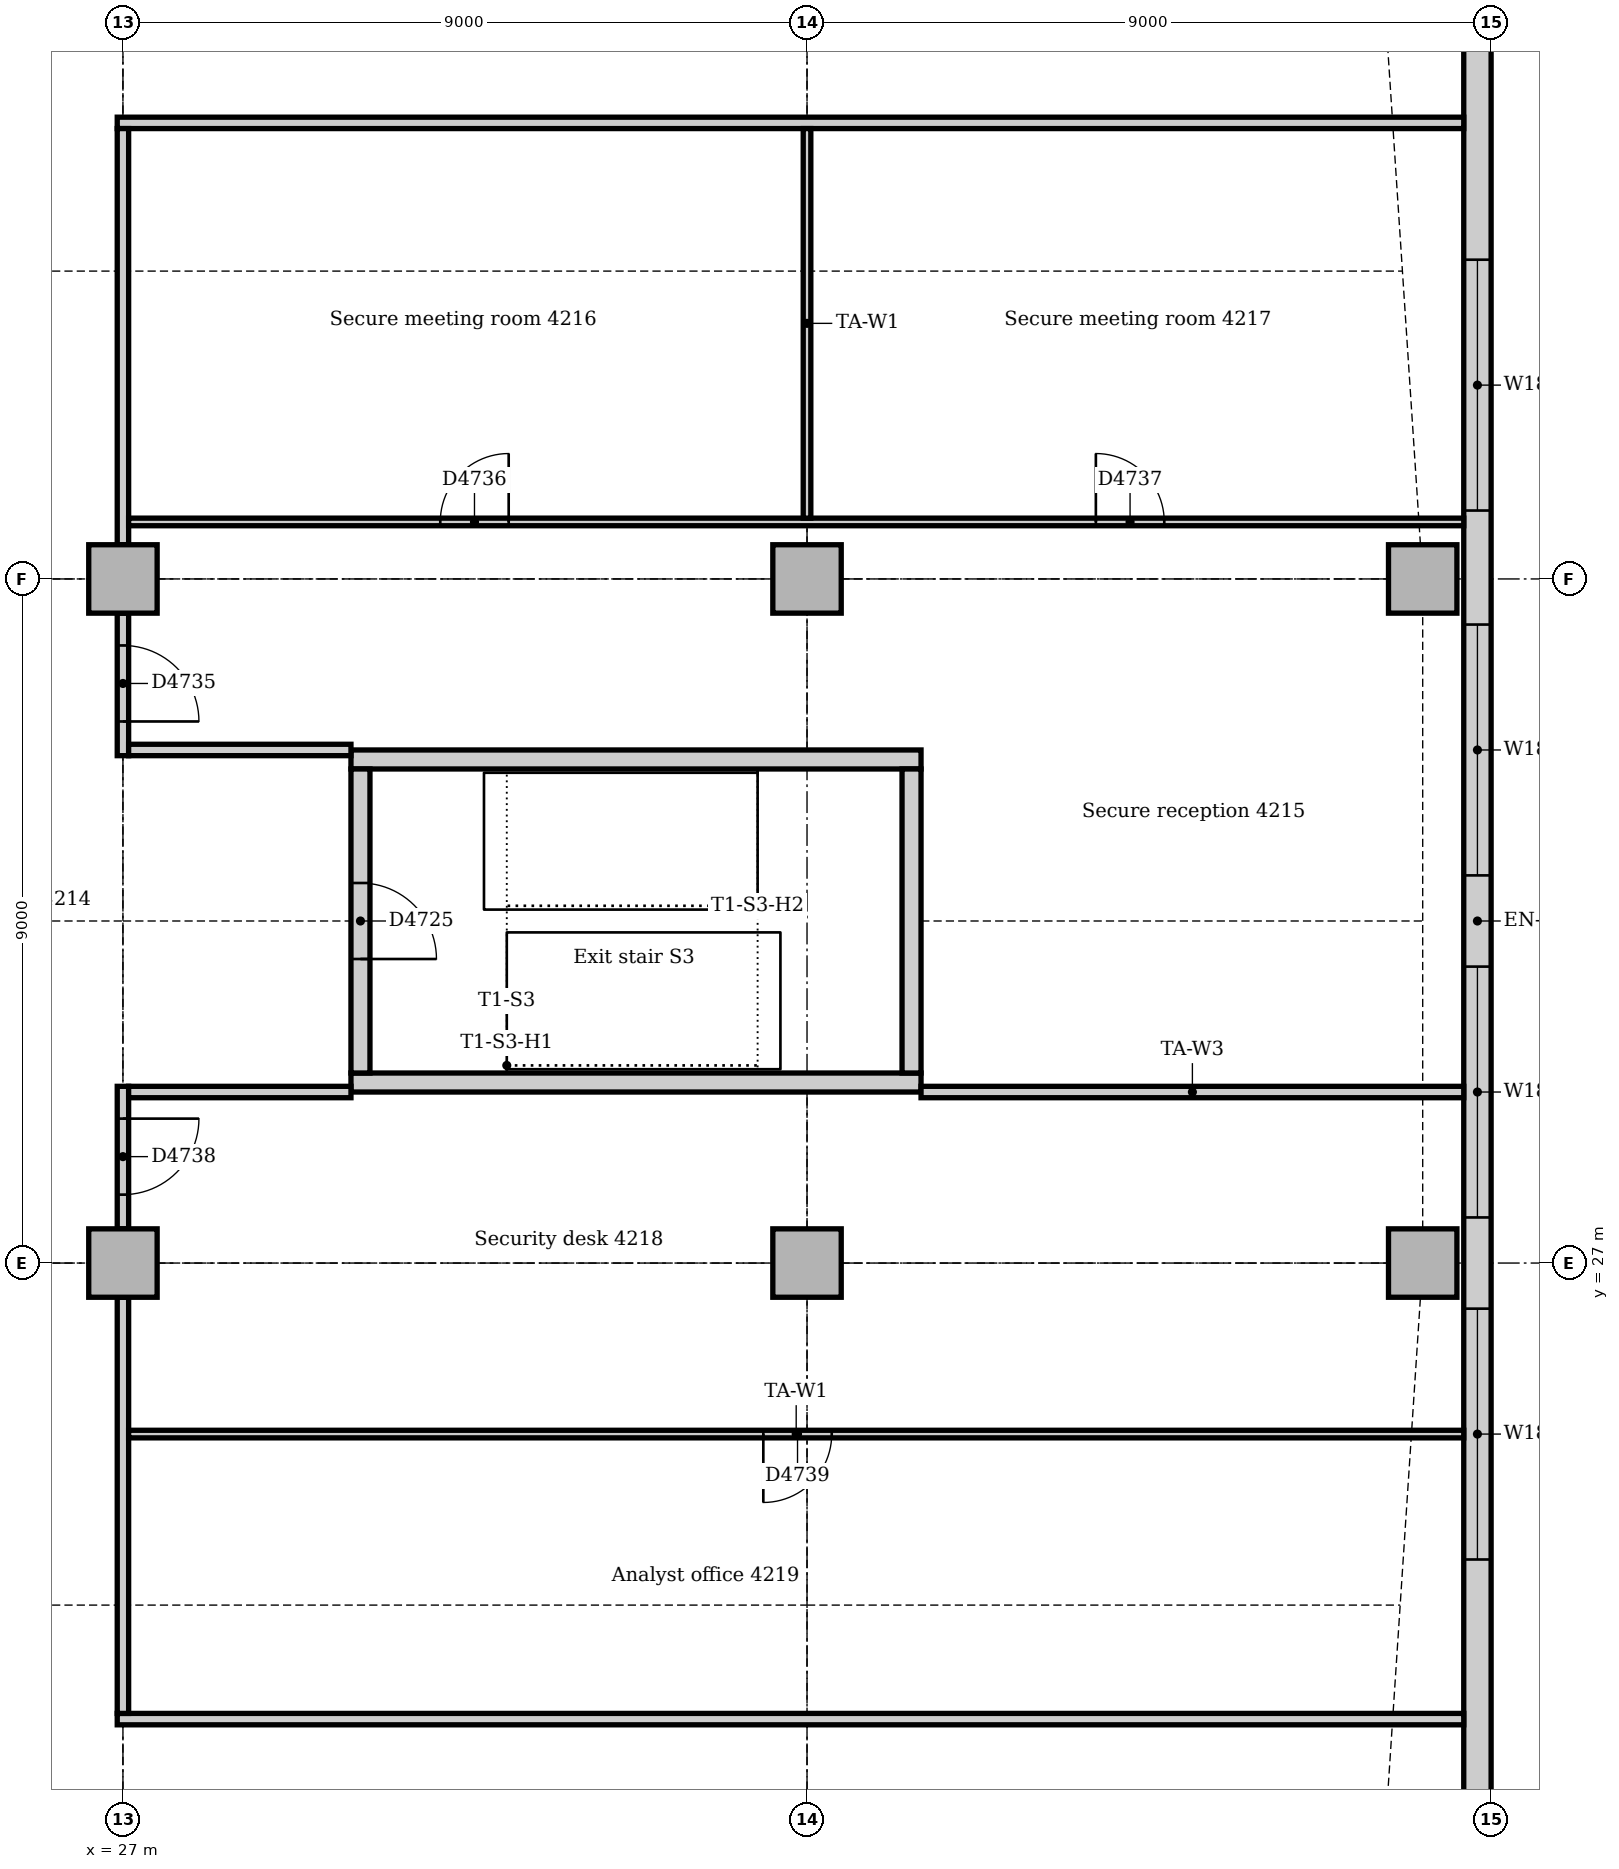
"""IFC4 building model, lengths in metres.
Left out: names, types, materials, properties, quantities, classifications, styles, units other than length and angle.
Written with IfcOpenShell. Run it as: python <this file> out.ifc"""

import sys

from ifc_helpers import new_model, si_unit, direction, frame, frame_2d, origin, origin_2d, place, context, subcontext, project, spatial, rectangle, extrude, element, fill, save


model = new_model("IFC4")
c1 = context("Model", 3, precision=1e-05, world=origin(), true_north=direction((0.0, 1.0)))
c2 = subcontext(c1, "Body", "Model", "MODEL_VIEW")
j1 = project(units=[si_unit("LENGTHUNIT", "METRE"), si_unit("PLANEANGLEUNIT", "RADIAN")], contexts=[c1])
p1 = place(None, origin())
s1 = spatial("IfcSite", under=j1, at=p1, CompositionType="ELEMENT")
p2 = place(p1, origin())
s2 = spatial("IfcBuilding", under=s1, at=p2, CompositionType="ELEMENT")
p3 = place(p2, frame((0.0, 0.0, 177.0)))
s3 = spatial("IfcBuildingStorey", under=s2, at=p3, CompositionType="ELEMENT", Elevation=177.0)
for number, where, z_axis, x_axis in (
    (1, (30.0, 29.375, 0.0), (0.0, 0.0, 1.0), (1.0, 0.0, 0.0)),
    (2, (37.5, 33.625, 0.0), (0.0, 0.0, 1.0), (-1.0, 0.0, 0.0)),
):
    element("IfcWall", number, at=place(p3, frame(where, z_axis=z_axis, x_axis=x_axis)), inside=s3, PredefinedType="SOLIDWALL", context=c2, shape_type="SweptSolid", body=[
        extrude(rectangle(XDim=7.5, YDim=0.25, at=frame_2d((3.75, 0.0))), origin(), (0.0, 0.0, 1.0), 4.0),
    ])
p4 = place(p3, frame((37.375, 29.5, 0.0), z_axis=(0.0, 0.0, 1.0), x_axis=(0.0, 1.0, 0.0)))
e3 = element("IfcWall", 3, at=p4, inside=s3, PredefinedType="SOLIDWALL", context=c2, shape_type="SweptSolid", body=[
    extrude(rectangle(XDim=4.0, YDim=0.25, at=frame_2d((2.0, 0.0))), origin(), (0.0, 0.0, 1.0), 4.0),
])
p5 = place(p3, frame((30.125, 33.5, 0.0), z_axis=(0.0, 0.0, 1.0), x_axis=(0.0, -1.0, 0.0)))
e4 = element("IfcWall", 4, at=p5, inside=s3, PredefinedType="SOLIDWALL", context=c2, shape_type="SweptSolid", body=[
    extrude(rectangle(XDim=4.0, YDim=0.25, at=frame_2d((2.0, 0.0))), origin(), (0.0, 0.0, 1.0), 4.0),
])
p6 = place(p5, frame((1.5, 0.0, 0.0)))
e5 = element("IfcOpeningElement", 5, at=p6, cuts=e4, PredefinedType="OPENING", context=c2, shape_type="SweptSolid", body=[
    extrude(rectangle(XDim=1.0, YDim=2.1, at=frame_2d((0.5, 1.05))), frame((0.0, 0.135, 0.0), z_axis=(0.0, -1.0, 0.0), x_axis=(1.0, 0.0, 0.0)), (0.0, 0.0, 1.0), 0.27),
])
for number, where, z_axis, x_axis in (
    (6, (44.1, 27.0, 0.0), (0.0, 0.0, 1.0), (1.0, 0.0, 0.0)),
    (7, (44.1, 36.0, 0.0), (0.0, 0.0, 1.0), (1.0, 0.0, 0.0)),
    (8, (27.0, 27.0, 0.0), (0.0, 0.0, 1.0), (1.0, 0.0, 0.0)),
    (9, (27.0, 36.0, 0.0), (0.0, 0.0, 1.0), (1.0, 0.0, 0.0)),
    (10, (36.0, 27.0, 0.0), (0.0, 0.0, 1.0), (1.0, 0.0, 0.0)),
    (11, (36.0, 36.0, 0.0), (0.0, 0.0, 1.0), (1.0, 0.0, 0.0)),
):
    element("IfcColumn", number, at=place(p3, frame(where, z_axis=z_axis, x_axis=x_axis)), inside=s3, PredefinedType="COLUMN", context=c2, shape_type="SweptSolid", body=[
        extrude(rectangle(XDim=0.9, YDim=0.9, at=origin_2d()), origin(), (0.0, 0.0, 1.0), 3.85),
    ])
p7 = place(p3, frame((44.82, 19.243, 0.0), z_axis=(0.0, 0.0, 1.0), x_axis=(0.0, 1.0, 0.0)))
e12 = element("IfcWall", 12, at=p7, inside=s3, PredefinedType="STANDARD", context=c2, shape_type="SweptSolid", body=[
    extrude(rectangle(XDim=24.515, YDim=0.36, at=frame_2d((12.257, 0.0))), origin(), (0.0, 0.0, 1.0), 3.85),
])
p8 = place(p7, frame((3.857, 0.0, 0.9)))
e13 = element("IfcOpeningElement", 13, at=p8, cuts=e12, PredefinedType="OPENING", context=c2, shape_type="SweptSolid", body=[
    extrude(rectangle(XDim=3.3, YDim=1.6, at=frame_2d((1.65, 0.8))), frame((0.0, 0.19, 0.0), z_axis=(0.0, -1.0, 0.0), x_axis=(1.0, 0.0, 0.0)), (0.0, 0.0, 1.0), 0.38),
])
p9 = place(p7, frame((8.357, 0.0, 0.9)))
e14 = element("IfcOpeningElement", 14, at=p9, cuts=e12, PredefinedType="OPENING", context=c2, shape_type="SweptSolid", body=[
    extrude(rectangle(XDim=3.3, YDim=1.6, at=frame_2d((1.65, 0.8))), frame((0.0, 0.19, 0.0), z_axis=(0.0, -1.0, 0.0), x_axis=(1.0, 0.0, 0.0)), (0.0, 0.0, 1.0), 0.38),
])
p10 = place(p7, frame((12.857, 0.0, 0.9)))
e15 = element("IfcOpeningElement", 15, at=p10, cuts=e12, PredefinedType="OPENING", context=c2, shape_type="SweptSolid", body=[
    extrude(rectangle(XDim=3.3, YDim=1.6, at=frame_2d((1.65, 0.8))), frame((0.0, 0.19, 0.0), z_axis=(0.0, -1.0, 0.0), x_axis=(1.0, 0.0, 0.0)), (0.0, 0.0, 1.0), 0.38),
])
p11 = place(p7, frame((17.657, 0.0, 0.9)))
e16 = element("IfcOpeningElement", 16, at=p11, cuts=e12, PredefinedType="OPENING", context=c2, shape_type="SweptSolid", body=[
    extrude(rectangle(XDim=3.3, YDim=1.6, at=frame_2d((1.65, 0.8))), frame((0.0, 0.19, 0.0), z_axis=(0.0, -1.0, 0.0), x_axis=(1.0, 0.0, 0.0)), (0.0, 0.0, 1.0), 0.38),
])
for number, where, z_axis, x_axis in (
    (17, (26.925, 21.0, 0.0), (0.0, 0.0, 1.0), (1.0, 0.0, 0.0)),
    (18, (26.925, 42.0, 0.0), (0.0, 0.0, 1.0), (1.0, 0.0, 0.0)),
):
    element("IfcWall", number, at=place(p3, frame(where, z_axis=z_axis, x_axis=x_axis)), inside=s3, PredefinedType="PARTITIONING", context=c2, shape_type="SweptSolid", body=[
        extrude(rectangle(XDim=17.715, YDim=0.15, at=frame_2d((8.857, 0.0))), origin(), (0.0, 0.0, 1.0), 3.85),
    ])
p12 = place(p3, frame((27.0, 21.075, 0.0), z_axis=(0.0, 0.0, 1.0), x_axis=(0.0, 1.0, 0.0)))
e19 = element("IfcWall", 19, at=p12, inside=s3, PredefinedType="PARTITIONING", context=c2, shape_type="SweptSolid", body=[
    extrude(rectangle(XDim=5.475, YDim=0.15, at=frame_2d((2.737, 0.0))), origin(), (0.0, 0.0, 1.0), 3.362),
])
p13 = place(p3, frame((27.0, 27.45, 0.0), z_axis=(0.0, 0.0, 1.0), x_axis=(0.0, 1.0, 0.0)))
e20 = element("IfcWall", 20, at=p13, inside=s3, PredefinedType="PARTITIONING", context=c2, shape_type="SweptSolid", body=[
    extrude(rectangle(XDim=1.875, YDim=0.15, at=frame_2d((0.938, 0.0))), origin(), (0.0, 0.0, 1.0), 3.362),
])
p14 = place(p13, frame((0.45, 0.0, 0.0)))
e21 = element("IfcOpeningElement", 21, at=p14, cuts=e20, PredefinedType="OPENING", context=c2, shape_type="SweptSolid", body=[
    extrude(rectangle(XDim=1.0, YDim=2.1, at=frame_2d((0.5, 1.05))), frame((0.0, 0.085, 0.0), z_axis=(0.0, -1.0, 0.0), x_axis=(1.0, 0.0, 0.0)), (0.0, 0.0, 1.0), 0.17),
])
p15 = place(p3, frame((27.0, 33.675, 0.0), z_axis=(0.0, 0.0, 1.0), x_axis=(0.0, 1.0, 0.0)))
e22 = element("IfcWall", 22, at=p15, inside=s3, PredefinedType="PARTITIONING", context=c2, shape_type="SweptSolid", body=[
    extrude(rectangle(XDim=1.875, YDim=0.15, at=frame_2d((0.938, 0.0))), origin(), (0.0, 0.0, 1.0), 3.362),
])
p16 = place(p15, frame((0.45, 0.0, 0.0)))
e23 = element("IfcOpeningElement", 23, at=p16, cuts=e22, PredefinedType="OPENING", context=c2, shape_type="SweptSolid", body=[
    extrude(rectangle(XDim=1.0, YDim=2.1, at=frame_2d((0.5, 1.05))), frame((0.0, 0.085, 0.0), z_axis=(0.0, -1.0, 0.0), x_axis=(1.0, 0.0, 0.0)), (0.0, 0.0, 1.0), 0.17),
])
p17 = place(p3, frame((27.0, 36.45, 0.0), z_axis=(0.0, 0.0, 1.0), x_axis=(0.0, 1.0, 0.0)))
e24 = element("IfcWall", 24, at=p17, inside=s3, PredefinedType="PARTITIONING", context=c2, shape_type="SweptSolid", body=[
    extrude(rectangle(XDim=5.475, YDim=0.15, at=frame_2d((2.737, 0.0))), origin(), (0.0, 0.0, 1.0), 3.362),
])
for number, where, z_axis, x_axis in (
    (25, (27.075, 29.25, 0.0), (0.0, 0.0, 1.0), (1.0, 0.0, 0.0)),
    (26, (27.075, 33.75, 0.0), (0.0, 0.0, 1.0), (1.0, 0.0, 0.0)),
):
    element("IfcWall", number, at=place(p3, frame(where, z_axis=z_axis, x_axis=x_axis)), inside=s3, PredefinedType="PARTITIONING", context=c2, shape_type="SweptSolid", body=[
        extrude(rectangle(XDim=2.925, YDim=0.15, at=frame_2d((1.462, 0.0))), origin(), (0.0, 0.0, 1.0), 3.85),
    ])
p18 = place(p3, frame((37.5, 29.25, 0.0), z_axis=(0.0, 0.0, 1.0), x_axis=(1.0, 0.0, 0.0)))
e27 = element("IfcWall", 27, at=p18, inside=s3, PredefinedType="PARTITIONING", context=c2, shape_type="SweptSolid", body=[
    extrude(rectangle(XDim=7.14, YDim=0.15, at=frame_2d((3.57, 0.0))), origin(), (0.0, 0.0, 1.0), 3.85),
])
p19 = place(p3, frame((27.075, 24.75, 0.0), z_axis=(0.0, 0.0, 1.0), x_axis=(1.0, 0.0, 0.0)))
e28 = element("IfcWall", 28, at=p19, inside=s3, PredefinedType="PARTITIONING", context=c2, shape_type="SweptSolid", body=[
    extrude(rectangle(XDim=17.565, YDim=0.1, at=frame_2d((8.783, 0.0))), origin(), (0.0, 0.0, 1.0), 3.85),
])
p20 = place(p19, frame((8.35, 0.0, 0.0)))
e29 = element("IfcOpeningElement", 29, at=p20, cuts=e28, PredefinedType="OPENING", context=c2, shape_type="SweptSolid", body=[
    extrude(rectangle(XDim=0.9, YDim=2.1, at=frame_2d((0.45, 1.05))), frame((0.0, 0.06, 0.0), z_axis=(0.0, -1.0, 0.0), x_axis=(1.0, 0.0, 0.0)), (0.0, 0.0, 1.0), 0.12),
])
p21 = place(p3, frame((27.075, 36.75, 0.0), z_axis=(0.0, 0.0, 1.0), x_axis=(1.0, 0.0, 0.0)))
e30 = element("IfcWall", 30, at=p21, inside=s3, PredefinedType="PARTITIONING", context=c2, shape_type="SweptSolid", body=[
    extrude(rectangle(XDim=17.565, YDim=0.1, at=frame_2d((8.783, 0.0))), origin(), (0.0, 0.0, 1.0), 3.85),
])
p22 = place(p21, frame((4.1, 0.0, 0.0)))
e31 = element("IfcOpeningElement", 31, at=p22, cuts=e30, PredefinedType="OPENING", context=c2, shape_type="SweptSolid", body=[
    extrude(rectangle(XDim=0.9, YDim=2.1, at=frame_2d((0.45, 1.05))), frame((0.0, 0.06, 0.0), z_axis=(0.0, -1.0, 0.0), x_axis=(1.0, 0.0, 0.0)), (0.0, 0.0, 1.0), 0.12),
])
p23 = place(p21, frame((12.725, 0.0, 0.0)))
e32 = element("IfcOpeningElement", 32, at=p23, cuts=e30, PredefinedType="OPENING", context=c2, shape_type="SweptSolid", body=[
    extrude(rectangle(XDim=0.9, YDim=2.1, at=frame_2d((0.45, 1.05))), frame((0.0, 0.06, 0.0), z_axis=(0.0, -1.0, 0.0), x_axis=(1.0, 0.0, 0.0)), (0.0, 0.0, 1.0), 0.12),
])
p24 = place(p3, frame((36.0, 36.8, 0.0), z_axis=(0.0, 0.0, 1.0), x_axis=(0.0, 1.0, 0.0)))
e33 = element("IfcWall", 33, at=p24, inside=s3, PredefinedType="PARTITIONING", context=c2, shape_type="SweptSolid", body=[
    extrude(rectangle(XDim=5.125, YDim=0.1, at=frame_2d((2.562, 0.0))), origin(), (0.0, 0.0, 1.0), 3.362),
])
p25 = place(p8, origin())
e34 = element("IfcWindow", 34, at=p25, inside=s3, PartitioningType="SINGLE_PANEL", PredefinedType="WINDOW", context=c2, shape_type="SweptSolid", body=[
    extrude(rectangle(XDim=3.3, YDim=1.6, at=frame_2d((1.65, 0.8))), frame((0.0, 0.13, 0.0), z_axis=(0.0, -1.0, 0.0), x_axis=(1.0, 0.0, 0.0)), (0.0, 0.0, 1.0), 0.06),
])
fill(e13, e34)
p26 = place(p9, origin())
e35 = element("IfcWindow", 35, at=p26, inside=s3, PartitioningType="SINGLE_PANEL", PredefinedType="WINDOW", context=c2, shape_type="SweptSolid", body=[
    extrude(rectangle(XDim=3.3, YDim=1.6, at=frame_2d((1.65, 0.8))), frame((0.0, 0.13, 0.0), z_axis=(0.0, -1.0, 0.0), x_axis=(1.0, 0.0, 0.0)), (0.0, 0.0, 1.0), 0.06),
])
fill(e14, e35)
p27 = place(p10, origin())
e36 = element("IfcWindow", 36, at=p27, inside=s3, PartitioningType="SINGLE_PANEL", PredefinedType="WINDOW", context=c2, shape_type="SweptSolid", body=[
    extrude(rectangle(XDim=3.3, YDim=1.6, at=frame_2d((1.65, 0.8))), frame((0.0, 0.13, 0.0), z_axis=(0.0, -1.0, 0.0), x_axis=(1.0, 0.0, 0.0)), (0.0, 0.0, 1.0), 0.06),
])
fill(e15, e36)
p28 = place(p11, origin())
e37 = element("IfcWindow", 37, at=p28, inside=s3, PartitioningType="SINGLE_PANEL", PredefinedType="WINDOW", context=c2, shape_type="SweptSolid", body=[
    extrude(rectangle(XDim=3.3, YDim=1.6, at=frame_2d((1.65, 0.8))), frame((0.0, 0.13, 0.0), z_axis=(0.0, -1.0, 0.0), x_axis=(1.0, 0.0, 0.0)), (0.0, 0.0, 1.0), 0.06),
])
fill(e16, e37)
p29 = place(p6, origin())
e38 = element("IfcDoor", 38, at=p29, inside=s3, OperationType="SINGLE_SWING_RIGHT", PredefinedType="DOOR", context=c2, shape_type="SweptSolid", body=[
    extrude(rectangle(XDim=1.0, YDim=2.1, at=frame_2d((0.5, 1.05))), frame((0.0, 0.025, 0.0), z_axis=(0.0, -1.0, 0.0), x_axis=(1.0, 0.0, 0.0)), (0.0, 0.0, 1.0), 0.05),
])
fill(e5, e38)
p30 = place(p16, frame((1.0, 0.0, 0.0), z_axis=(0.0, 0.0, 1.0), x_axis=(-1.0, 0.0, 0.0)))
e39 = element("IfcDoor", 39, at=p30, inside=s3, OperationType="SINGLE_SWING_RIGHT", PredefinedType="DOOR", context=c2, shape_type="SweptSolid", body=[
    extrude(rectangle(XDim=1.0, YDim=2.1, at=frame_2d((0.5, 1.05))), frame((0.0, 0.025, 0.0), z_axis=(0.0, -1.0, 0.0), x_axis=(1.0, 0.0, 0.0)), (0.0, 0.0, 1.0), 0.05),
])
fill(e23, e39)
p31 = place(p22, origin())
e40 = element("IfcDoor", 40, at=p31, inside=s3, OperationType="SINGLE_SWING_RIGHT", PredefinedType="DOOR", context=c2, shape_type="SweptSolid", body=[
    extrude(rectangle(XDim=0.9, YDim=2.1, at=frame_2d((0.45, 1.05))), frame((0.0, 0.025, 0.0), z_axis=(0.0, -1.0, 0.0), x_axis=(1.0, 0.0, 0.0)), (0.0, 0.0, 1.0), 0.05),
])
fill(e31, e40)
p32 = place(p23, origin())
e41 = element("IfcDoor", 41, at=p32, inside=s3, OperationType="SINGLE_SWING_LEFT", PredefinedType="DOOR", context=c2, shape_type="SweptSolid", body=[
    extrude(rectangle(XDim=0.9, YDim=2.1, at=frame_2d((0.45, 1.05))), frame((0.0, 0.025, 0.0), z_axis=(0.0, -1.0, 0.0), x_axis=(1.0, 0.0, 0.0)), (0.0, 0.0, 1.0), 0.05),
])
fill(e32, e41)
p33 = place(p14, frame((1.0, 0.0, 0.0), z_axis=(0.0, 0.0, 1.0), x_axis=(-1.0, 0.0, 0.0)))
e42 = element("IfcDoor", 42, at=p33, inside=s3, OperationType="SINGLE_SWING_LEFT", PredefinedType="DOOR", context=c2, shape_type="SweptSolid", body=[
    extrude(rectangle(XDim=1.0, YDim=2.1, at=frame_2d((0.5, 1.05))), frame((0.0, 0.025, 0.0), z_axis=(0.0, -1.0, 0.0), x_axis=(1.0, 0.0, 0.0)), (0.0, 0.0, 1.0), 0.05),
])
fill(e21, e42)
p34 = place(p20, frame((0.9, 0.0, 0.0), z_axis=(0.0, 0.0, 1.0), x_axis=(-1.0, 0.0, 0.0)))
e43 = element("IfcDoor", 43, at=p34, inside=s3, OperationType="SINGLE_SWING_RIGHT", PredefinedType="DOOR", context=c2, shape_type="SweptSolid", body=[
    extrude(rectangle(XDim=0.9, YDim=2.1, at=frame_2d((0.45, 1.05))), frame((0.0, 0.025, 0.0), z_axis=(0.0, -1.0, 0.0), x_axis=(1.0, 0.0, 0.0)), (0.0, 0.0, 1.0), 0.05),
])
fill(e29, e43)
save(model, sys.argv[1])
